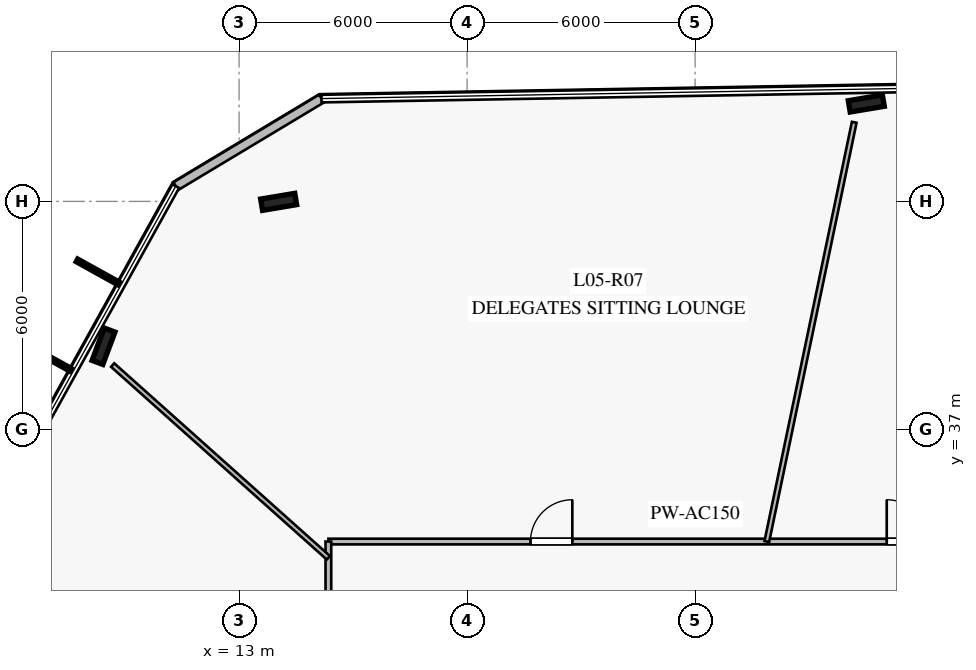
"""IFC4 building model, lengths in metres.
Left out: names, types, materials, properties, quantities, classifications, styles, units other than length and angle.
Written with IfcOpenShell. Run it as: python <this file> out.ifc"""

import sys

from ifc_helpers import new_model, si_unit, direction, frame, frame_2d, origin, origin_2d, place, context, subcontext, project, spatial, rectangle, i_section, extrude, element, fill, save


model = new_model("IFC4")
c1 = context("Model", 3, precision=1e-05, world=origin(), true_north=direction((0.0, 1.0)))
c2 = subcontext(c1, "Body", "Model", "MODEL_VIEW")
j1 = project(units=[si_unit("LENGTHUNIT", "METRE"), si_unit("PLANEANGLEUNIT", "RADIAN")], contexts=[c1])
p1 = place(None, origin())
s1 = spatial("IfcSite", under=j1, at=p1, CompositionType="ELEMENT")
p2 = place(p1, origin())
s2 = spatial("IfcBuilding", under=s1, at=p2, CompositionType="ELEMENT")
p3 = place(p2, frame((0.0, 0.0, 24.0)))
s3 = spatial("IfcBuildingStorey", under=s2, at=p3, CompositionType="ELEMENT", Elevation=24.0)
for number, where, z_axis, x_axis in (
    (1, (29.505, 45.576, -0.24), (0.0, 0.0, 1.0), (0.986, 0.165, 0.0)),
    (2, (14.042, 42.988, -0.24), (0.0, 0.0, 1.0), (0.986, 0.165, 0.0)),
    (3, (9.433, 39.189, -0.24), (0.0, 0.0, 1.0), (0.35, 0.937, 0.0)),
):
    element("IfcColumn", number, at=place(p3, frame(where, z_axis=z_axis, x_axis=x_axis)), inside=s3, PredefinedType="COLUMN", context=c2, shape_type="SweptSolid", body=[
        extrude(i_section(OverallWidth=0.302, OverallDepth=0.91, WebThickness=0.021, FlangeThickness=0.04, at=origin_2d()), origin(), (0.0, 0.0, 1.0), 4.24),
    ])
p4 = place(p3, frame((15.169, 45.705, 0.0), z_axis=(0.0, 0.0, 1.0), x_axis=(-0.857174976065, -0.515025300745, 0.0)))
e4 = element("IfcWall", 4, at=p4, inside=s3, PredefinedType="STANDARD", context=c2, shape_type="SweptSolid", body=[
    extrude(rectangle(XDim=4.474, YDim=0.24, at=frame_2d((2.237, 0.0))), origin(), (0.0, 0.0, 1.0), 3.76),
])
p5 = place(p3, frame((15.35, 34.05, 0.0), z_axis=(0.0, 0.0, 1.0), x_axis=(1.0, 0.0, 0.0)))
e5 = element("IfcWall", 5, at=p5, inside=s3, PredefinedType="PARTITIONING", context=c2, shape_type="SweptSolid", body=[
    extrude(rectangle(XDim=19.3, YDim=0.15, at=frame_2d((9.65, 0.0))), origin(), (0.0, 0.0, 1.0), 3.21),
])
p6 = place(p5, frame((14.693, 0.0, 0.0)))
e6 = element("IfcOpeningElement", 6, at=p6, cuts=e5, PredefinedType="OPENING", context=c2, shape_type="SweptSolid", body=[
    extrude(rectangle(XDim=1.1, YDim=2.2, at=frame_2d((0.55, 1.1))), frame((0.0, 0.085, 0.0), z_axis=(0.0, -1.0, 0.0), x_axis=(1.0, 0.0, 0.0)), (0.0, 0.0, 1.0), 0.17),
])
p7 = place(p5, frame((5.319, 0.0, 0.0)))
e7 = element("IfcOpeningElement", 7, at=p7, cuts=e5, PredefinedType="OPENING", context=c2, shape_type="SweptSolid", body=[
    extrude(rectangle(XDim=1.1, YDim=2.2, at=frame_2d((0.55, 1.1))), frame((0.0, 0.085, 0.0), z_axis=(0.0, -1.0, 0.0), x_axis=(1.0, 0.0, 0.0)), (0.0, 0.0, 1.0), 0.17),
])
p8 = place(p3, frame((15.35, 15.95, 0.0), z_axis=(0.0, 0.0, 1.0), x_axis=(0.0, 1.0, 0.0)))
e8 = element("IfcWall", 8, at=p8, inside=s3, PredefinedType="PARTITIONING", context=c2, shape_type="SweptSolid", body=[
    extrude(rectangle(XDim=18.1, YDim=0.15, at=frame_2d((9.05, 0.0))), origin(), (0.0, 0.0, 1.0), 3.21),
])
p9 = place(p8, frame((11.332, 0.0, 0.0)))
e9 = element("IfcOpeningElement", 9, at=p9, cuts=e8, PredefinedType="OPENING", context=c2, shape_type="SweptSolid", body=[
    extrude(rectangle(XDim=1.1, YDim=2.2, at=frame_2d((0.55, 1.1))), frame((0.0, 0.085, 0.0), z_axis=(0.0, -1.0, 0.0), x_axis=(1.0, 0.0, 0.0)), (0.0, 0.0, 1.0), 0.17),
])
p10 = place(p3, frame((26.887, 34.05, 0.0), z_axis=(0.0, 0.0, 1.0), x_axis=(0.204117775604, 0.97894633851, 0.0)))
e10 = element("IfcWall", 10, at=p10, inside=s3, PredefinedType="PARTITIONING", context=c2, shape_type="SweptSolid", body=[
    extrude(rectangle(XDim=11.268, YDim=0.125, at=frame_2d((5.634, 0.0))), origin(), (0.0, 0.0, 1.0), 3.76),
])
p11 = place(p3, frame((15.35, 33.622, 0.0), z_axis=(0.0, 0.0, 1.0), x_axis=(-0.745724240471, 0.666254723941, 0.0)))
e11 = element("IfcWall", 11, at=p11, inside=s3, PredefinedType="PARTITIONING", context=c2, shape_type="SweptSolid", body=[
    extrude(rectangle(XDim=7.613, YDim=0.125, at=frame_2d((3.806, 0.0))), origin(), (0.0, 0.0, 1.0), 3.05),
])
p12 = place(p6, origin())
e12 = element("IfcDoor", 12, at=p12, inside=s3, OperationType="SINGLE_SWING_LEFT", PredefinedType="DOOR", context=c2, shape_type="SweptSolid", body=[
    extrude(rectangle(XDim=1.1, YDim=2.2, at=frame_2d((0.55, 1.1))), frame((0.0, 0.025, 0.0), z_axis=(0.0, -1.0, 0.0), x_axis=(1.0, 0.0, 0.0)), (0.0, 0.0, 1.0), 0.05),
])
fill(e6, e12)
p13 = place(p7, origin())
e13 = element("IfcDoor", 13, at=p13, inside=s3, OperationType="SINGLE_SWING_RIGHT", PredefinedType="DOOR", context=c2, shape_type="SweptSolid", body=[
    extrude(rectangle(XDim=1.1, YDim=2.2, at=frame_2d((0.55, 1.1))), frame((0.0, 0.025, 0.0), z_axis=(0.0, -1.0, 0.0), x_axis=(1.0, 0.0, 0.0)), (0.0, 0.0, 1.0), 0.05),
])
fill(e7, e13)
save(model, sys.argv[1])
